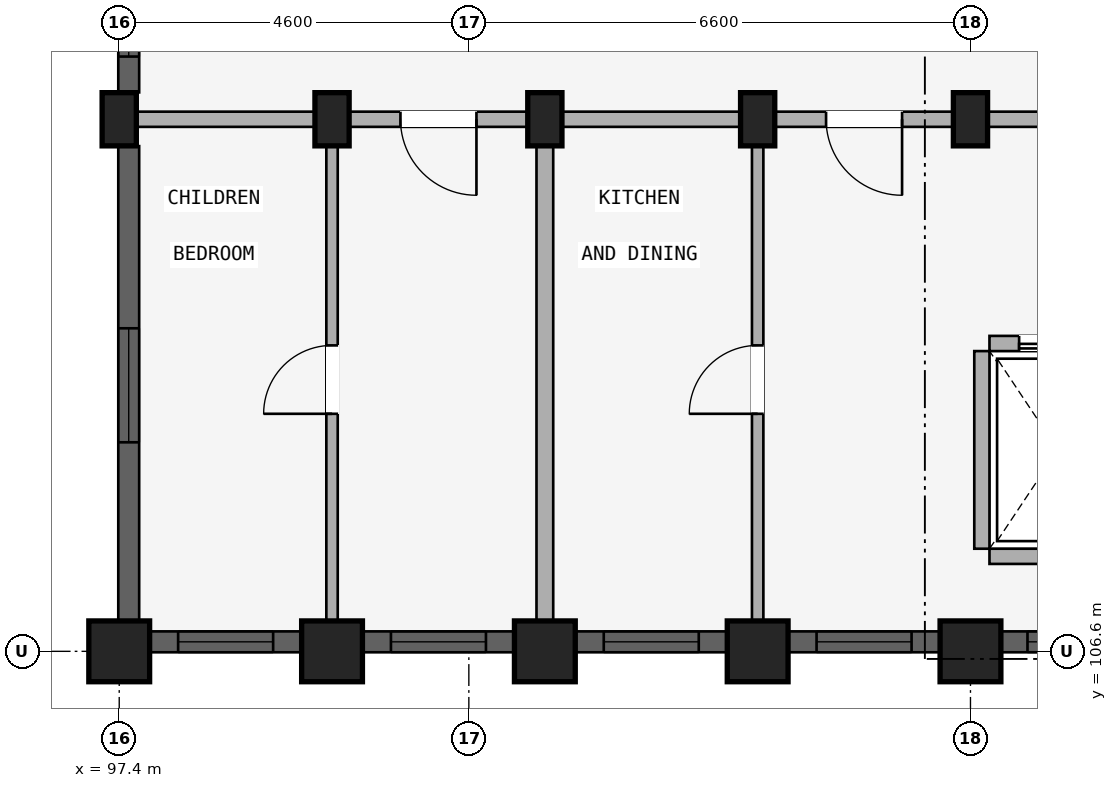
"""IFC4 building model, lengths in metres.
Left out: names, types, materials, properties, quantities, classifications, styles, units other than length and angle.
Written with IfcOpenShell. Run it as: python <this file> out.ifc"""

import sys

from ifc_helpers import new_model, si_unit, direction, frame, frame_2d, origin, origin_2d, place, context, subcontext, project, spatial, rectangle, extrude, element, fill, save


model = new_model("IFC4")
c1 = context("Model", 3, precision=1e-05, world=origin(), true_north=direction((0.0, 1.0)))
c2 = subcontext(c1, "Body", "Model", "MODEL_VIEW")
j1 = project(units=[si_unit("LENGTHUNIT", "METRE"), si_unit("PLANEANGLEUNIT", "RADIAN")], contexts=[c1])
p1 = place(None, origin())
s1 = spatial("IfcSite", under=j1, at=p1, CompositionType="ELEMENT")
p2 = place(p1, origin())
s2 = spatial("IfcBuilding", under=s1, at=p2, CompositionType="ELEMENT")
p3 = place(p2, frame((0.0, 0.0, 11.85)))
s3 = spatial("IfcBuildingStorey", under=s2, at=p3, CompositionType="ELEMENT", Elevation=11.85)
p4 = place(p3, frame((108.6, 106.6, 0.0), z_axis=(0.0, 0.0, 1.0), x_axis=(1.0, 0.0, 0.0)))
e1 = element("IfcColumn", 1, at=p4, inside=s3, PredefinedType="COLUMN", context=c2, shape_type="SweptSolid", body=[
    extrude(rectangle(XDim=0.8, YDim=0.8, at=origin_2d()), origin(), (0.0, 0.0, 1.0), 2.93),
])
p5 = place(p3, frame((108.6, 113.6, 0.0), z_axis=(0.0, 0.0, 1.0), x_axis=(1.0, 0.0, 0.0)))
e2 = element("IfcColumn", 2, at=p5, inside=s3, PredefinedType="COLUMN", context=c2, shape_type="SweptSolid", body=[
    extrude(rectangle(XDim=0.45, YDim=0.7, at=origin_2d()), origin(), (0.0, 0.0, 1.0), 2.93),
])
p6 = place(p3, frame((105.8, 106.6, 0.0), z_axis=(0.0, 0.0, 1.0), x_axis=(1.0, 0.0, 0.0)))
e3 = element("IfcColumn", 3, at=p6, inside=s3, PredefinedType="COLUMN", context=c2, shape_type="SweptSolid", body=[
    extrude(rectangle(XDim=0.8, YDim=0.8, at=origin_2d()), origin(), (0.0, 0.0, 1.0), 2.93),
])
p7 = place(p3, frame((105.8, 113.6, 0.0), z_axis=(0.0, 0.0, 1.0), x_axis=(1.0, 0.0, 0.0)))
e4 = element("IfcColumn", 4, at=p7, inside=s3, PredefinedType="COLUMN", context=c2, shape_type="SweptSolid", body=[
    extrude(rectangle(XDim=0.45, YDim=0.7, at=origin_2d()), origin(), (0.0, 0.0, 1.0), 2.93),
])
p8 = place(p3, frame((103.0, 106.6, 0.0), z_axis=(0.0, 0.0, 1.0), x_axis=(1.0, 0.0, 0.0)))
e5 = element("IfcColumn", 5, at=p8, inside=s3, PredefinedType="COLUMN", context=c2, shape_type="SweptSolid", body=[
    extrude(rectangle(XDim=0.8, YDim=0.8, at=origin_2d()), origin(), (0.0, 0.0, 1.0), 2.93),
])
p9 = place(p3, frame((103.0, 113.6, 0.0), z_axis=(0.0, 0.0, 1.0), x_axis=(1.0, 0.0, 0.0)))
e6 = element("IfcColumn", 6, at=p9, inside=s3, PredefinedType="COLUMN", context=c2, shape_type="SweptSolid", body=[
    extrude(rectangle(XDim=0.45, YDim=0.7, at=origin_2d()), origin(), (0.0, 0.0, 1.0), 2.93),
])
p10 = place(p3, frame((100.2, 106.6, 0.0), z_axis=(0.0, 0.0, 1.0), x_axis=(1.0, 0.0, 0.0)))
e7 = element("IfcColumn", 7, at=p10, inside=s3, PredefinedType="COLUMN", context=c2, shape_type="SweptSolid", body=[
    extrude(rectangle(XDim=0.8, YDim=0.8, at=origin_2d()), origin(), (0.0, 0.0, 1.0), 2.93),
])
p11 = place(p3, frame((100.2, 113.6, 0.0), z_axis=(0.0, 0.0, 1.0), x_axis=(1.0, 0.0, 0.0)))
e8 = element("IfcColumn", 8, at=p11, inside=s3, PredefinedType="COLUMN", context=c2, shape_type="SweptSolid", body=[
    extrude(rectangle(XDim=0.45, YDim=0.7, at=origin_2d()), origin(), (0.0, 0.0, 1.0), 2.93),
])
p12 = place(p3, frame((97.4, 106.6, 0.0), z_axis=(0.0, 0.0, 1.0), x_axis=(1.0, 0.0, 0.0)))
e9 = element("IfcColumn", 9, at=p12, inside=s3, PredefinedType="COLUMN", context=c2, shape_type="SweptSolid", body=[
    extrude(rectangle(XDim=0.8, YDim=0.8, at=origin_2d()), origin(), (0.0, 0.0, 1.0), 2.93),
])
p13 = place(p3, frame((97.4, 113.6, 0.0), z_axis=(0.0, 0.0, 1.0), x_axis=(1.0, 0.0, 0.0)))
e10 = element("IfcColumn", 10, at=p13, inside=s3, PredefinedType="COLUMN", context=c2, shape_type="SweptSolid", body=[
    extrude(rectangle(XDim=0.45, YDim=0.7, at=origin_2d()), origin(), (0.0, 0.0, 1.0), 2.93),
])
p14 = place(p3, frame((108.75, 107.95, 0.0), z_axis=(0.0, 0.0, 1.0), x_axis=(0.0, 1.0, 0.0)))
e11 = element("IfcWall", 11, at=p14, inside=s3, PredefinedType="STANDARD", context=c2, shape_type="SweptSolid", body=[
    extrude(rectangle(XDim=2.6, YDim=0.2, at=frame_2d((1.3, 0.0))), origin(), (0.0, 0.0, 1.0), 2.372),
])
p15 = place(p3, frame((110.65, 107.85, 0.0), z_axis=(0.0, 0.0, 1.0), x_axis=(-1.0, 0.0, 0.0)))
e12 = element("IfcWall", 12, at=p15, inside=s3, PredefinedType="STANDARD", context=c2, shape_type="SweptSolid", body=[
    extrude(rectangle(XDim=1.8, YDim=0.2, at=frame_2d((0.9, 0.0))), origin(), (0.0, 0.0, 1.0), 2.93),
])
p16 = place(p3, frame((110.65, 110.65, 0.0), z_axis=(0.0, 0.0, 1.0), x_axis=(-1.0, 0.0, 0.0)))
e13 = element("IfcWall", 13, at=p16, inside=s3, PredefinedType="STANDARD", context=c2, shape_type="SweptSolid", body=[
    extrude(rectangle(XDim=1.8, YDim=0.2, at=frame_2d((0.9, 0.0))), origin(), (0.0, 0.0, 1.0), 2.93),
])
p17 = place(p16, frame((0.39, 0.0, 0.0)))
e14 = element("IfcOpeningElement", 14, at=p17, cuts=e13, PredefinedType="OPENING", context=c2, shape_type="SweptSolid", body=[
    extrude(rectangle(XDim=1.02, YDim=2.15, at=frame_2d((0.51, 1.075))), frame((0.0, 0.11, 0.0), z_axis=(0.0, -1.0, 0.0), x_axis=(1.0, 0.0, 0.0)), (0.0, 0.0, 1.0), 0.22),
])
p18 = place(p3, frame((114.25, 113.6, 0.0), z_axis=(0.0, 0.0, 1.0), x_axis=(-1.0, 0.0, 0.0)))
e15 = element("IfcWall", 15, at=p18, inside=s3, PredefinedType="STANDARD", context=c2, shape_type="SweptSolid", body=[
    extrude(rectangle(XDim=5.6, YDim=0.2, at=frame_2d((2.8, 0.0))), origin(), (0.0, 0.0, 1.0), 2.372),
])
p19 = place(p18, frame((1.91, 0.0, 0.0)))
e16 = element("IfcOpeningElement", 16, at=p19, cuts=e15, PredefinedType="OPENING", context=c2, shape_type="SweptSolid", body=[
    extrude(rectangle(XDim=1.22, YDim=2.15, at=frame_2d((0.61, 1.075))), frame((0.0, 0.11, 0.0), z_axis=(0.0, -1.0, 0.0), x_axis=(1.0, 0.0, 0.0)), (0.0, 0.0, 1.0), 0.22),
])
p20 = place(p3, frame((108.6, 113.6, 0.0), z_axis=(0.0, 0.0, 1.0), x_axis=(-1.0, 0.0, 0.0)))
e17 = element("IfcWall", 17, at=p20, inside=s3, PredefinedType="STANDARD", context=c2, shape_type="SweptSolid", body=[
    extrude(rectangle(XDim=2.8, YDim=0.2, at=frame_2d((1.4, 0.0))), origin(), (0.0, 0.0, 1.0), 2.372),
])
p21 = place(p20, frame((0.9, 0.0, 0.0)))
e18 = element("IfcOpeningElement", 18, at=p21, cuts=e17, PredefinedType="OPENING", context=c2, shape_type="SweptSolid", body=[
    extrude(rectangle(XDim=1.0, YDim=2.15, at=frame_2d((0.5, 1.075))), frame((0.0, 0.11, 0.0), z_axis=(0.0, -1.0, 0.0), x_axis=(1.0, 0.0, 0.0)), (0.0, 0.0, 1.0), 0.22),
])
p22 = place(p3, frame((105.8, 113.6, 0.0), z_axis=(0.0, 0.0, 1.0), x_axis=(-1.0, 0.0, 0.0)))
e19 = element("IfcWall", 19, at=p22, inside=s3, PredefinedType="STANDARD", context=c2, shape_type="SweptSolid", body=[
    extrude(rectangle(XDim=2.8, YDim=0.2, at=frame_2d((1.4, 0.0))), origin(), (0.0, 0.0, 1.0), 2.372),
])
p23 = place(p3, frame((103.0, 113.6, 0.0), z_axis=(0.0, 0.0, 1.0), x_axis=(-1.0, 0.0, 0.0)))
e20 = element("IfcWall", 20, at=p23, inside=s3, PredefinedType="STANDARD", context=c2, shape_type="SweptSolid", body=[
    extrude(rectangle(XDim=2.8, YDim=0.2, at=frame_2d((1.4, 0.0))), origin(), (0.0, 0.0, 1.0), 2.372),
])
p24 = place(p23, frame((0.9, 0.0, 0.0)))
e21 = element("IfcOpeningElement", 21, at=p24, cuts=e20, PredefinedType="OPENING", context=c2, shape_type="SweptSolid", body=[
    extrude(rectangle(XDim=1.0, YDim=2.15, at=frame_2d((0.5, 1.075))), frame((0.0, 0.11, 0.0), z_axis=(0.0, -1.0, 0.0), x_axis=(1.0, 0.0, 0.0)), (0.0, 0.0, 1.0), 0.22),
])
p25 = place(p3, frame((100.2, 113.6, 0.0), z_axis=(0.0, 0.0, 1.0), x_axis=(-1.0, 0.0, 0.0)))
e22 = element("IfcWall", 22, at=p25, inside=s3, PredefinedType="STANDARD", context=c2, shape_type="SweptSolid", body=[
    extrude(rectangle(XDim=2.8, YDim=0.2, at=frame_2d((1.4, 0.0))), origin(), (0.0, 0.0, 1.0), 2.372),
])
p26 = place(p3, frame((105.8, 106.8, 0.0), z_axis=(0.0, 0.0, 1.0), x_axis=(0.0, 1.0, 0.0)))
e23 = element("IfcWall", 23, at=p26, inside=s3, PredefinedType="PARTITIONING", context=c2, shape_type="SweptSolid", body=[
    extrude(rectangle(XDim=6.75, YDim=0.15, at=frame_2d((3.375, 0.0))), origin(), (0.0, 0.0, 1.0), 2.372),
])
p27 = place(p26, frame((2.925, 0.0, 0.0)))
e24 = element("IfcOpeningElement", 24, at=p27, cuts=e23, PredefinedType="OPENING", context=c2, shape_type="SweptSolid", body=[
    extrude(rectangle(XDim=0.9, YDim=2.1, at=frame_2d((0.45, 1.05))), frame((0.0, 0.085, 0.0), z_axis=(0.0, -1.0, 0.0), x_axis=(1.0, 0.0, 0.0)), (0.0, 0.0, 1.0), 0.17),
])
p28 = place(p3, frame((103.0, 106.8, 0.0), z_axis=(0.0, 0.0, 1.0), x_axis=(0.0, 1.0, 0.0)))
e25 = element("IfcWall", 25, at=p28, inside=s3, PredefinedType="STANDARD", context=c2, shape_type="SweptSolid", body=[
    extrude(rectangle(XDim=6.75, YDim=0.22, at=frame_2d((3.375, 0.0))), origin(), (0.0, 0.0, 1.0), 2.372),
])
p29 = place(p3, frame((100.2, 106.8, 0.0), z_axis=(0.0, 0.0, 1.0), x_axis=(0.0, 1.0, 0.0)))
e26 = element("IfcWall", 26, at=p29, inside=s3, PredefinedType="PARTITIONING", context=c2, shape_type="SweptSolid", body=[
    extrude(rectangle(XDim=6.75, YDim=0.15, at=frame_2d((3.375, 0.0))), origin(), (0.0, 0.0, 1.0), 2.372),
])
p30 = place(p29, frame((2.925, 0.0, 0.0)))
e27 = element("IfcOpeningElement", 27, at=p30, cuts=e26, PredefinedType="OPENING", context=c2, shape_type="SweptSolid", body=[
    extrude(rectangle(XDim=0.9, YDim=2.1, at=frame_2d((0.45, 1.05))), frame((0.0, 0.085, 0.0), z_axis=(0.0, -1.0, 0.0), x_axis=(1.0, 0.0, 0.0)), (0.0, 0.0, 1.0), 0.17),
])
p31 = place(p3, frame((111.372, 106.725, 0.0), z_axis=(0.0, 0.0, 1.0), x_axis=(-1.0, 0.0, 0.0)))
e28 = element("IfcWall", 28, at=p31, inside=s3, PredefinedType="STANDARD", context=c2, shape_type="SweptSolid", body=[
    extrude(rectangle(XDim=2.422, YDim=0.275, at=frame_2d((1.211, 0.0))), origin(), (0.0, 0.0, 1.0), 2.472),
])
p32 = place(p31, frame((0.822, 0.0, 0.772)))
e29 = element("IfcOpeningElement", 29, at=p32, cuts=e28, PredefinedType="OPENING", context=c2, shape_type="SweptSolid", body=[
    extrude(rectangle(XDim=1.2, YDim=1.5, at=frame_2d((0.6, 0.75))), frame((0.0, 0.147, 0.0), z_axis=(0.0, -1.0, 0.0), x_axis=(1.0, 0.0, 0.0)), (0.0, 0.0, 1.0), 0.295),
])
p33 = place(p3, frame((108.197, 106.725, 0.0), z_axis=(0.0, 0.0, 1.0), x_axis=(-1.0, 0.0, 0.0)))
e30 = element("IfcWall", 30, at=p33, inside=s3, PredefinedType="STANDARD", context=c2, shape_type="SweptSolid", body=[
    extrude(rectangle(XDim=1.993, YDim=0.275, at=frame_2d((0.997, 0.0))), origin(), (0.0, 0.0, 1.0), 2.472),
])
p34 = place(p33, frame((0.372, 0.0, 0.722)))
e31 = element("IfcOpeningElement", 31, at=p34, cuts=e30, PredefinedType="OPENING", context=c2, shape_type="SweptSolid", body=[
    extrude(rectangle(XDim=1.25, YDim=1.55, at=frame_2d((0.625, 0.775))), frame((0.0, 0.147, 0.0), z_axis=(0.0, -1.0, 0.0), x_axis=(1.0, 0.0, 0.0)), (0.0, 0.0, 1.0), 0.295),
])
p35 = place(p3, frame((105.396, 106.725, 0.0), z_axis=(0.0, 0.0, 1.0), x_axis=(-1.0, 0.0, 0.0)))
e32 = element("IfcWall", 32, at=p35, inside=s3, PredefinedType="STANDARD", context=c2, shape_type="SweptSolid", body=[
    extrude(rectangle(XDim=1.993, YDim=0.275, at=frame_2d((0.997, 0.0))), origin(), (0.0, 0.0, 1.0), 2.472),
])
p36 = place(p35, frame((0.372, 0.0, 0.722)))
e33 = element("IfcOpeningElement", 33, at=p36, cuts=e32, PredefinedType="OPENING", context=c2, shape_type="SweptSolid", body=[
    extrude(rectangle(XDim=1.25, YDim=1.55, at=frame_2d((0.625, 0.775))), frame((0.0, 0.147, 0.0), z_axis=(0.0, -1.0, 0.0), x_axis=(1.0, 0.0, 0.0)), (0.0, 0.0, 1.0), 0.295),
])
p37 = place(p3, frame((102.596, 106.725, 0.0), z_axis=(0.0, 0.0, 1.0), x_axis=(-1.0, 0.0, 0.0)))
e34 = element("IfcWall", 34, at=p37, inside=s3, PredefinedType="STANDARD", context=c2, shape_type="SweptSolid", body=[
    extrude(rectangle(XDim=1.993, YDim=0.275, at=frame_2d((0.997, 0.0))), origin(), (0.0, 0.0, 1.0), 2.472),
])
p38 = place(p37, frame((0.372, 0.0, 0.722)))
e35 = element("IfcOpeningElement", 35, at=p38, cuts=e34, PredefinedType="OPENING", context=c2, shape_type="SweptSolid", body=[
    extrude(rectangle(XDim=1.25, YDim=1.55, at=frame_2d((0.625, 0.775))), frame((0.0, 0.147, 0.0), z_axis=(0.0, -1.0, 0.0), x_axis=(1.0, 0.0, 0.0)), (0.0, 0.0, 1.0), 0.295),
])
p39 = place(p3, frame((99.796, 106.725, 0.0), z_axis=(0.0, 0.0, 1.0), x_axis=(-1.0, 0.0, 0.0)))
e36 = element("IfcWall", 36, at=p39, inside=s3, PredefinedType="STANDARD", context=c2, shape_type="SweptSolid", body=[
    extrude(rectangle(XDim=1.993, YDim=0.275, at=frame_2d((0.997, 0.0))), origin(), (0.0, 0.0, 1.0), 2.472),
])
p40 = place(p39, frame((0.372, 0.0, 0.722)))
e37 = element("IfcOpeningElement", 37, at=p40, cuts=e36, PredefinedType="OPENING", context=c2, shape_type="SweptSolid", body=[
    extrude(rectangle(XDim=1.25, YDim=1.55, at=frame_2d((0.625, 0.775))), frame((0.0, 0.147, 0.0), z_axis=(0.0, -1.0, 0.0), x_axis=(1.0, 0.0, 0.0)), (0.0, 0.0, 1.0), 0.295),
])
p41 = place(p3, frame((97.525, 107.003, 0.0), z_axis=(0.0, 0.0, 1.0), x_axis=(0.0, 1.0, 0.0)))
e38 = element("IfcWall", 38, at=p41, inside=s3, PredefinedType="STANDARD", context=c2, shape_type="SweptSolid", body=[
    extrude(rectangle(XDim=6.243, YDim=0.275, at=frame_2d((3.122, 0.0))), origin(), (0.0, 0.0, 1.0), 2.372),
])
p42 = place(p41, frame((2.346, 0.0, 0.522)))
e39 = element("IfcOpeningElement", 39, at=p42, cuts=e38, PredefinedType="OPENING", context=c2, shape_type="SweptSolid", body=[
    extrude(rectangle(XDim=1.5, YDim=1.65, at=frame_2d((0.75, 0.825))), frame((0.0, 0.147, 0.0), z_axis=(0.0, -1.0, 0.0), x_axis=(1.0, 0.0, 0.0)), (0.0, 0.0, 1.0), 0.295),
])
p43 = place(p3, frame((97.525, 113.954, 0.0), z_axis=(0.0, 0.0, 1.0), x_axis=(0.0, 1.0, 0.0)))
e40 = element("IfcWall", 40, at=p43, inside=s3, PredefinedType="STANDARD", context=c2, shape_type="SweptSolid", body=[
    extrude(rectangle(XDim=1.693, YDim=0.275, at=frame_2d((0.846, 0.0))), origin(), (0.0, 0.0, 1.0), 2.372),
])
p44 = place(p43, frame((0.471, 0.0, 0.88)))
e41 = element("IfcOpeningElement", 41, at=p44, cuts=e40, PredefinedType="OPENING", context=c2, shape_type="SweptSolid", body=[
    extrude(rectangle(XDim=0.75, YDim=1.05, at=frame_2d((0.375, 0.525))), frame((0.0, 0.147, 0.0), z_axis=(0.0, -1.0, 0.0), x_axis=(1.0, 0.0, 0.0)), (0.0, 0.0, 1.0), 0.295),
])
p45 = place(p32, origin())
e42 = element("IfcWindow", 42, at=p45, inside=s3, PartitioningType="SINGLE_PANEL", PredefinedType="WINDOW", context=c2, shape_type="SweptSolid", body=[
    extrude(rectangle(XDim=1.2, YDim=1.5, at=frame_2d((0.6, 0.75))), frame((0.0, 0.03, 0.0), z_axis=(0.0, -1.0, 0.0), x_axis=(1.0, 0.0, 0.0)), (0.0, 0.0, 1.0), 0.06),
])
fill(e29, e42)
p46 = place(p34, origin())
e43 = element("IfcWindow", 43, at=p46, inside=s3, PartitioningType="SINGLE_PANEL", PredefinedType="WINDOW", context=c2, shape_type="SweptSolid", body=[
    extrude(rectangle(XDim=1.25, YDim=1.55, at=frame_2d((0.625, 0.775))), frame((0.0, 0.03, 0.0), z_axis=(0.0, -1.0, 0.0), x_axis=(1.0, 0.0, 0.0)), (0.0, 0.0, 1.0), 0.06),
])
fill(e31, e43)
p47 = place(p36, origin())
e44 = element("IfcWindow", 44, at=p47, inside=s3, PartitioningType="SINGLE_PANEL", PredefinedType="WINDOW", context=c2, shape_type="SweptSolid", body=[
    extrude(rectangle(XDim=1.25, YDim=1.55, at=frame_2d((0.625, 0.775))), frame((0.0, 0.03, 0.0), z_axis=(0.0, -1.0, 0.0), x_axis=(1.0, 0.0, 0.0)), (0.0, 0.0, 1.0), 0.06),
])
fill(e33, e44)
p48 = place(p38, origin())
e45 = element("IfcWindow", 45, at=p48, inside=s3, PartitioningType="SINGLE_PANEL", PredefinedType="WINDOW", context=c2, shape_type="SweptSolid", body=[
    extrude(rectangle(XDim=1.25, YDim=1.55, at=frame_2d((0.625, 0.775))), frame((0.0, 0.03, 0.0), z_axis=(0.0, -1.0, 0.0), x_axis=(1.0, 0.0, 0.0)), (0.0, 0.0, 1.0), 0.06),
])
fill(e35, e45)
p49 = place(p40, origin())
e46 = element("IfcWindow", 46, at=p49, inside=s3, PartitioningType="SINGLE_PANEL", PredefinedType="WINDOW", context=c2, shape_type="SweptSolid", body=[
    extrude(rectangle(XDim=1.25, YDim=1.55, at=frame_2d((0.625, 0.775))), frame((0.0, 0.03, 0.0), z_axis=(0.0, -1.0, 0.0), x_axis=(1.0, 0.0, 0.0)), (0.0, 0.0, 1.0), 0.06),
])
fill(e37, e46)
p50 = place(p42, origin())
e47 = element("IfcWindow", 47, at=p50, inside=s3, PartitioningType="DOUBLE_PANEL_VERTICAL", PredefinedType="WINDOW", context=c2, shape_type="SweptSolid", body=[
    extrude(rectangle(XDim=1.5, YDim=1.65, at=frame_2d((0.75, 0.825))), frame((0.0, 0.03, 0.0), z_axis=(0.0, -1.0, 0.0), x_axis=(1.0, 0.0, 0.0)), (0.0, 0.0, 1.0), 0.06),
])
fill(e39, e47)
p51 = place(p44, origin())
e48 = element("IfcWindow", 48, at=p51, inside=s3, PartitioningType="SINGLE_PANEL", PredefinedType="WINDOW", context=c2, shape_type="SweptSolid", body=[
    extrude(rectangle(XDim=0.75, YDim=1.05, at=frame_2d((0.375, 0.525))), frame((0.0, 0.03, 0.0), z_axis=(0.0, -1.0, 0.0), x_axis=(1.0, 0.0, 0.0)), (0.0, 0.0, 1.0), 0.06),
])
fill(e41, e48)
p52 = place(p17, origin())
e49 = element("IfcDoor", 49, at=p52, inside=s3, OperationType="SLIDING_TO_RIGHT", PredefinedType="DOOR", context=c2, shape_type="SweptSolid", body=[
    extrude(rectangle(XDim=1.02, YDim=2.15, at=frame_2d((0.51, 1.075))), frame((0.0, 0.025, 0.0), z_axis=(0.0, -1.0, 0.0), x_axis=(1.0, 0.0, 0.0)), (0.0, 0.0, 1.0), 0.05),
])
fill(e14, e49)
p53 = place(p21, frame((1.0, 0.0, 0.0), z_axis=(0.0, 0.0, 1.0), x_axis=(-1.0, 0.0, 0.0)))
e50 = element("IfcDoor", 50, at=p53, inside=s3, OperationType="SINGLE_SWING_RIGHT", PredefinedType="DOOR", context=c2, shape_type="SweptSolid", body=[
    extrude(rectangle(XDim=1.0, YDim=2.15, at=frame_2d((0.5, 1.075))), frame((0.0, 0.025, 0.0), z_axis=(0.0, -1.0, 0.0), x_axis=(1.0, 0.0, 0.0)), (0.0, 0.0, 1.0), 0.05),
])
fill(e18, e50)
p54 = place(p24, frame((1.0, 0.0, 0.0), z_axis=(0.0, 0.0, 1.0), x_axis=(-1.0, 0.0, 0.0)))
e51 = element("IfcDoor", 51, at=p54, inside=s3, OperationType="SINGLE_SWING_RIGHT", PredefinedType="DOOR", context=c2, shape_type="SweptSolid", body=[
    extrude(rectangle(XDim=1.0, YDim=2.15, at=frame_2d((0.5, 1.075))), frame((0.0, 0.025, 0.0), z_axis=(0.0, -1.0, 0.0), x_axis=(1.0, 0.0, 0.0)), (0.0, 0.0, 1.0), 0.05),
])
fill(e21, e51)
p55 = place(p27, origin())
e52 = element("IfcDoor", 52, at=p55, inside=s3, OperationType="SINGLE_SWING_LEFT", PredefinedType="DOOR", context=c2, shape_type="SweptSolid", body=[
    extrude(rectangle(XDim=0.9, YDim=2.1, at=frame_2d((0.45, 1.05))), frame((0.0, 0.025, 0.0), z_axis=(0.0, -1.0, 0.0), x_axis=(1.0, 0.0, 0.0)), (0.0, 0.0, 1.0), 0.05),
])
fill(e24, e52)
p56 = place(p30, frame((0.9, 0.0, 0.0), z_axis=(0.0, 0.0, 1.0), x_axis=(-1.0, 0.0, 0.0)))
e53 = element("IfcDoor", 53, at=p56, inside=s3, OperationType="SINGLE_SWING_RIGHT", PredefinedType="DOOR", context=c2, shape_type="SweptSolid", body=[
    extrude(rectangle(XDim=0.9, YDim=2.1, at=frame_2d((0.45, 1.05))), frame((0.0, 0.025, 0.0), z_axis=(0.0, -1.0, 0.0), x_axis=(1.0, 0.0, 0.0)), (0.0, 0.0, 1.0), 0.05),
])
fill(e27, e53)
save(model, sys.argv[1])
